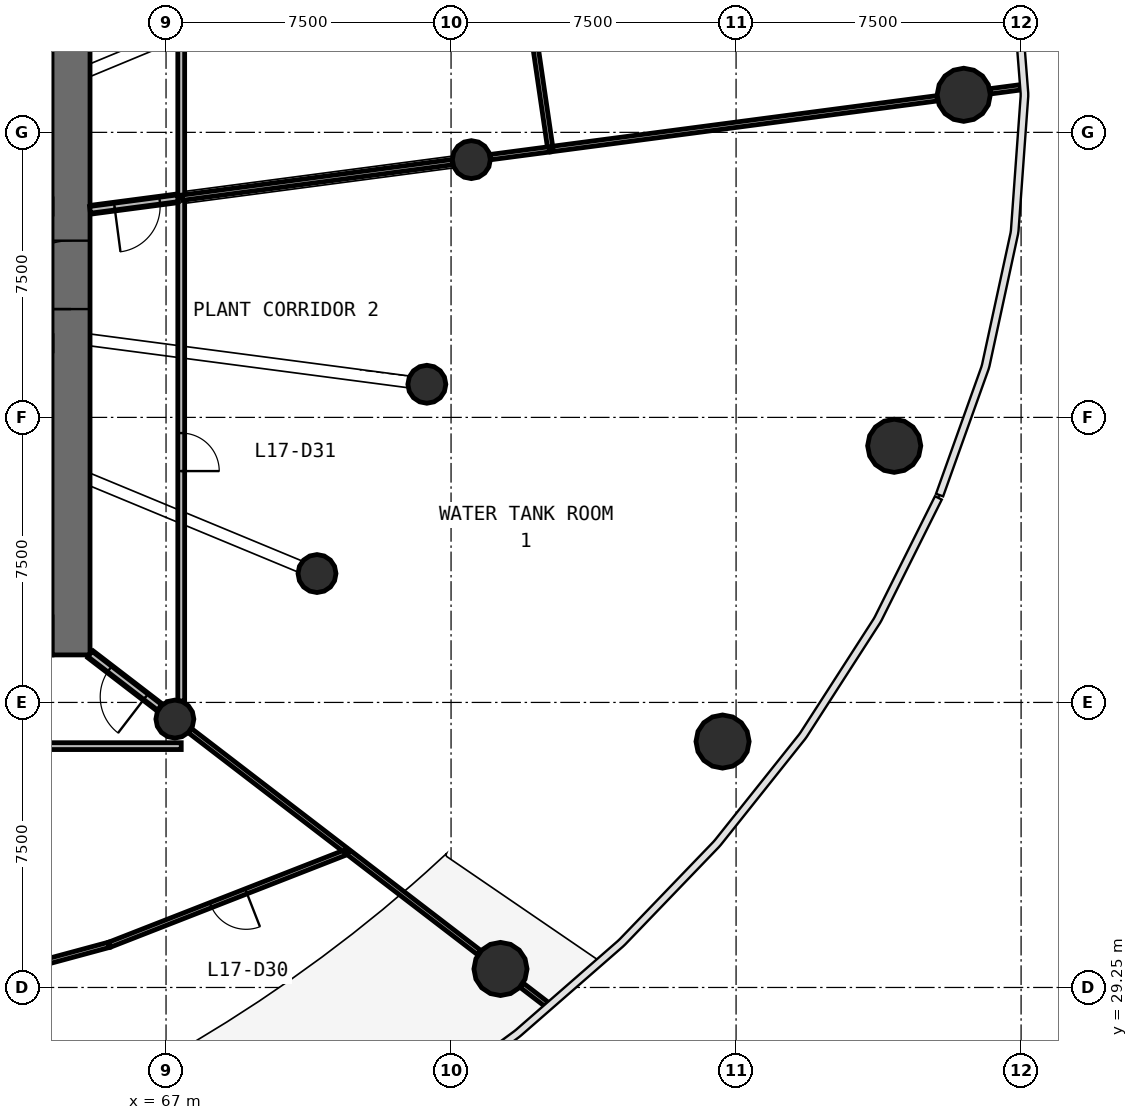
"""IFC4 building model, lengths in metres.
Left out: names, types, materials, properties, quantities, classifications, styles, units other than length and angle.
Written with IfcOpenShell. Run it as: python <this file> out.ifc"""

import sys

from ifc_helpers import new_model, si_unit, direction, frame, frame_2d, origin, origin_2d, place, context, subcontext, project, spatial, rectangle, circle, extrude, source, transform, mapped, element, fill, save


model = new_model("IFC4")
c1 = context("Model", 3, precision=1e-05, world=origin(), true_north=direction((0.0, 1.0)))
c2 = subcontext(c1, "Body", "Model", "MODEL_VIEW")
j1 = project(units=[si_unit("LENGTHUNIT", "METRE"), si_unit("PLANEANGLEUNIT", "RADIAN")], contexts=[c1])
p1 = place(None, origin())
s1 = spatial("IfcSite", under=j1, at=p1, CompositionType="ELEMENT")
p2 = place(p1, origin())
s2 = spatial("IfcBuilding", under=s1, at=p2, CompositionType="ELEMENT")
p3 = place(p2, frame((0.0, 0.0, 75.4)))
s3 = spatial("IfcBuildingStorey", under=s2, at=p3, CompositionType="ELEMENT", Elevation=75.4)
p4 = place(p3, frame((64.5, 38.0, 0.0), z_axis=(0.0, 0.0, 1.0), x_axis=(0.0, 1.0, 0.0)))
e1 = element("IfcWall", 1, at=p4, inside=s3, PredefinedType="SHEAR", context=c2, shape_type="SweptSolid", body=[
    extrude(rectangle(XDim=20.0, YDim=1.0, at=frame_2d((10.0, 0.0))), origin(), (0.0, 0.0, 1.0), 4.4),
])
p5 = place(p4, frame((9.1, 0.0, 0.0)))
e2 = element("IfcOpeningElement", 2, at=p5, cuts=e1, PredefinedType="OPENING", context=c2, shape_type="SweptSolid", body=[
    extrude(rectangle(XDim=1.8, YDim=2.1, at=frame_2d((0.9, 1.05))), frame((0.0, 0.51, 0.0), z_axis=(0.0, -1.0, 0.0), x_axis=(1.0, 0.0, 0.0)), (0.0, 0.0, 1.0), 1.02),
])
m1 = source(origin(), c2, "Body", "SweptSolid", [
    extrude(circle(Radius=0.7, at=origin_2d()), origin(), (0.0, 0.0, 1.0), 4.0),
])
for number, where, z_axis, x_axis in (
    (3, (87.99, 52.738, 0.0), (0.0, 0.0, 1.0), (1.0, 0.0, 0.0)),
    (4, (75.801, 29.737, 0.0), (0.0, 0.0, 1.0), (1.0, 0.0, 0.0)),
    (5, (81.645, 35.721, 0.0), (0.0, 0.0, 1.0), (1.0, 0.0, 0.0)),
    (6, (86.161, 43.503, 0.0), (0.0, 0.0, 1.0), (1.0, 0.0, 0.0)),
):
    element("IfcColumn", number, at=place(p3, frame(where, z_axis=z_axis, x_axis=x_axis)), inside=s3, PredefinedType="COLUMN", context=c2, shape_type="MappedRepresentation", body=[
        mapped(m1, transform((0.0, 0.0, 0.0), scale=1.0)),
    ])
m2 = source(origin(), c2, "Body", "SweptSolid", [
    extrude(circle(Radius=0.5, at=origin_2d()), origin(), (0.0, 0.0, 1.0), 4.4),
])
for number, where, z_axis, x_axis in (
    (7, (75.034, 51.032, 0.0), (0.0, 0.0, 1.0), (1.0, 0.0, 0.0)),
    (8, (67.232, 36.312, 0.0), (0.0, 0.0, 1.0), (1.0, 0.0, 0.0)),
    (9, (70.972, 40.141, 0.0), (0.0, 0.0, 1.0), (1.0, 0.0, 0.0)),
    (10, (73.863, 45.122, 0.0), (0.0, 0.0, 1.0), (1.0, 0.0, 0.0)),
):
    element("IfcColumn", number, at=place(p3, frame(where, z_axis=z_axis, x_axis=x_axis)), inside=s3, PredefinedType="COLUMN", context=c2, shape_type="MappedRepresentation", body=[
        mapped(m2, transform((0.0, 0.0, 0.0), scale=1.0)),
    ])
p6 = place(p3, frame((67.4, 35.6, 0.0), z_axis=(0.0, 0.0, 1.0), x_axis=(-1.0, 0.0, 0.0)))
e11 = element("IfcWall", 11, at=p6, inside=s3, PredefinedType="PARTITIONING", context=c2, shape_type="SweptSolid", body=[
    extrude(rectangle(XDim=13.767, YDim=0.18, at=frame_2d((6.884, 0.0))), origin(), (0.0, 0.0, 1.0), 2.8),
])
p7 = place(p6, frame((6.317, 0.0, 0.0)))
e12 = element("IfcOpeningElement", 12, at=p7, cuts=e11, PredefinedType="OPENING", context=c2, shape_type="SweptSolid", body=[
    extrude(rectangle(XDim=1.0, YDim=2.1, at=frame_2d((0.5, 1.05))), frame((0.0, 0.1, 0.0), z_axis=(0.0, -1.0, 0.0), x_axis=(1.0, 0.0, 0.0)), (0.0, 0.0, 1.0), 0.2),
])
p8 = place(p3, frame((67.4, 50.027, 0.0), z_axis=(0.0, 0.0, 1.0), x_axis=(0.0, -1.0, 0.0)))
e13 = element("IfcWall", 13, at=p8, inside=s3, PredefinedType="PARTITIONING", context=c2, shape_type="SweptSolid", body=[
    extrude(rectangle(XDim=13.24, YDim=0.18, at=frame_2d((6.62, 0.0))), origin(), (0.0, 0.0, 1.0), 2.8),
])
p9 = place(p8, frame((6.19, 0.0, 0.0)))
e14 = element("IfcOpeningElement", 14, at=p9, cuts=e13, PredefinedType="OPENING", context=c2, shape_type="SweptSolid", body=[
    extrude(rectangle(XDim=1.0, YDim=2.1, at=frame_2d((0.5, 1.05))), frame((0.0, 0.1, 0.0), z_axis=(0.0, -1.0, 0.0), x_axis=(1.0, 0.0, 0.0)), (0.0, 0.0, 1.0), 0.2),
])
p10 = place(p3, frame((67.4, 60.4, 0.0), z_axis=(0.0, 0.0, 1.0), x_axis=(0.0, -1.0, 0.0)))
e15 = element("IfcWall", 15, at=p10, inside=s3, PredefinedType="PARTITIONING", context=c2, shape_type="SweptSolid", body=[
    extrude(rectangle(XDim=10.343, YDim=0.18, at=frame_2d((5.171, 0.0))), origin(), (0.0, 0.0, 1.0), 2.8),
])
p11 = place(p10, frame((4.693, 0.0, 0.0)))
e16 = element("IfcOpeningElement", 16, at=p11, cuts=e15, PredefinedType="OPENING", context=c2, shape_type="SweptSolid", body=[
    extrude(rectangle(XDim=1.0, YDim=2.1, at=frame_2d((0.5, 1.05))), frame((0.0, 0.1, 0.0), z_axis=(0.0, -1.0, 0.0), x_axis=(1.0, 0.0, 0.0)), (0.0, 0.0, 1.0), 0.2),
])
p12 = place(p3, frame((67.31, 50.016, 0.0), z_axis=(0.0, 0.0, 1.0), x_axis=(-0.991440737811, -0.130557509967, 0.0)))
e17 = element("IfcWall", 17, at=p12, inside=s3, PredefinedType="PARTITIONING", context=c2, shape_type="SweptSolid", body=[
    extrude(rectangle(XDim=2.33, YDim=0.18, at=frame_2d((1.165, 0.0))), origin(), (0.0, 0.0, 1.0), 2.8),
])
p13 = place(p12, frame((0.48, 0.0, 0.0)))
e18 = element("IfcOpeningElement", 18, at=p13, cuts=e17, PredefinedType="OPENING", context=c2, shape_type="SweptSolid", body=[
    extrude(rectangle(XDim=1.2, YDim=2.1, at=frame_2d((0.6, 1.05))), frame((0.0, 0.1, 0.0), z_axis=(0.0, -1.0, 0.0), x_axis=(1.0, 0.0, 0.0)), (0.0, 0.0, 1.0), 0.2),
])
p14 = place(p3, frame((66.832, 36.619, 0.0), z_axis=(0.0, 0.0, 1.0), x_axis=(-0.793393624489, 0.608708926023, 0.0)))
e19 = element("IfcWall", 19, at=p14, inside=s3, PredefinedType="PARTITIONING", context=c2, shape_type="SweptSolid", body=[
    extrude(rectangle(XDim=2.309, YDim=0.18, at=frame_2d((1.155, 0.0))), origin(), (0.0, 0.0, 1.0), 2.8),
])
p15 = place(p14, frame((0.459, 0.0, 0.0)))
e20 = element("IfcOpeningElement", 20, at=p15, cuts=e19, PredefinedType="OPENING", context=c2, shape_type="SweptSolid", body=[
    extrude(rectangle(XDim=1.2, YDim=2.1, at=frame_2d((0.6, 1.05))), frame((0.0, 0.1, 0.0), z_axis=(0.0, -1.0, 0.0), x_axis=(1.0, 0.0, 0.0)), (0.0, 0.0, 1.0), 0.2),
])
p16 = place(p3, frame((77.115, 51.306, 0.0), z_axis=(0.0, 0.0, 1.0), x_axis=(0.991445064554, 0.130524648905, 0.0)))
e21 = element("IfcWall", 21, at=p16, inside=s3, PredefinedType="PARTITIONING", context=c2, shape_type="SweptSolid", body=[
    extrude(rectangle(XDim=10.265, YDim=0.14, at=frame_2d((5.133, 0.0))), origin(), (0.0, 0.0, 1.0), 2.8),
])
p17 = place(p3, frame((67.43, 50.031, 0.0), z_axis=(0.0, 0.0, 1.0), x_axis=(0.991448495935, 0.130498582014, 0.0)))
e22 = element("IfcWall", 22, at=p17, inside=s3, PredefinedType="PARTITIONING", context=c2, shape_type="SweptSolid", body=[
    extrude(rectangle(XDim=7.165, YDim=0.14, at=frame_2d((3.583, 0.0))), origin(), (0.0, 0.0, 1.0), 2.8),
])
p18 = place(p3, frame((76.141, 57.968, 0.0), z_axis=(0.0, 0.0, 1.0), x_axis=(0.144720027083, -0.989472644271, 0.0)))
e23 = element("IfcWall", 23, at=p18, inside=s3, PredefinedType="PARTITIONING", context=c2, shape_type="SweptSolid", body=[
    extrude(rectangle(XDim=6.702, YDim=0.14, at=frame_2d((3.351, 0.0))), origin(), (0.0, 0.0, 1.0), 2.8),
])
p19 = place(p18, frame((2.852, 0.0, 0.0)))
e24 = element("IfcOpeningElement", 24, at=p19, cuts=e23, PredefinedType="OPENING", context=c2, shape_type="SweptSolid", body=[
    extrude(rectangle(XDim=1.0, YDim=2.1, at=frame_2d((0.5, 1.05))), frame((0.0, 0.08, 0.0), z_axis=(0.0, -1.0, 0.0), x_axis=(1.0, 0.0, 0.0)), (0.0, 0.0, 1.0), 0.16),
])
p20 = place(p3, frame((71.778, 32.824, 0.0), z_axis=(0.0, 0.0, 1.0), x_axis=(-0.931368207831, -0.36407864733, 0.0)))
e25 = element("IfcWall", 25, at=p20, inside=s3, PredefinedType="PARTITIONING", context=c2, shape_type="SweptSolid", body=[
    extrude(rectangle(XDim=6.717, YDim=0.14, at=frame_2d((3.358, 0.0))), origin(), (0.0, 0.0, 1.0), 2.8),
])
p21 = place(p20, frame((2.867, 0.0, 0.0)))
e26 = element("IfcOpeningElement", 26, at=p21, cuts=e25, PredefinedType="OPENING", context=c2, shape_type="SweptSolid", body=[
    extrude(rectangle(XDim=1.0, YDim=2.1, at=frame_2d((0.5, 1.05))), frame((0.0, 0.08, 0.0), z_axis=(0.0, -1.0, 0.0), x_axis=(1.0, 0.0, 0.0)), (0.0, 0.0, 1.0), 0.16),
])
p22 = place(p3, frame((59.926, 28.865, 0.0), z_axis=(0.0, 0.0, 1.0), x_axis=(0.965338892276, 0.260999661033, 0.0)))
e27 = element("IfcWall", 27, at=p22, inside=s3, PredefinedType="PARTITIONING", context=c2, shape_type="SweptSolid", body=[
    extrude(rectangle(XDim=5.767, YDim=0.14, at=frame_2d((2.883, 0.0))), origin(), (0.0, 0.0, 1.0), 2.8),
])
p23 = place(p3, frame((67.633, 36.005, 0.0), z_axis=(0.0, 0.0, 1.0), x_axis=(0.793361042254, -0.608751391484, 0.0)))
e28 = element("IfcWall", 28, at=p23, inside=s3, PredefinedType="PARTITIONING", context=c2, shape_type="SweptSolid", body=[
    extrude(rectangle(XDim=5.143, YDim=0.14, at=frame_2d((2.572, 0.0))), origin(), (0.0, 0.0, 1.0), 2.8),
])
p24 = place(p3, frame((71.802, 32.806, 0.0), z_axis=(0.0, 0.0, 1.0), x_axis=(0.793358014638, -0.608755337233, 0.0)))
e29 = element("IfcWall", 29, at=p24, inside=s3, PredefinedType="PARTITIONING", context=c2, shape_type="SweptSolid", body=[
    extrude(rectangle(XDim=4.336, YDim=0.14, at=frame_2d((2.168, 0.0))), origin(), (0.0, 0.0, 1.0), 2.8),
])
p25 = place(p3, frame((75.534, 51.098, 0.0), z_axis=(0.0, 0.0, 1.0), x_axis=(0.991455357704, 0.130446439887, 0.0)))
e30 = element("IfcWall", 30, at=p25, inside=s3, PredefinedType="PARTITIONING", context=c2, shape_type="SweptSolid", body=[
    extrude(rectangle(XDim=1.565, YDim=0.14, at=frame_2d((0.782, 0.0))), origin(), (0.0, 0.0, 1.0), 2.8),
])
p26 = place(p3, frame((76.359, 29.309, 0.0), z_axis=(0.0, 0.0, 1.0), x_axis=(0.793252635304, -0.608892647832, 0.0)))
e31 = element("IfcWall", 31, at=p26, inside=s3, PredefinedType="PARTITIONING", context=c2, shape_type="SweptSolid", body=[
    extrude(rectangle(XDim=0.822, YDim=0.14, at=frame_2d((0.411, 0.0))), origin(), (0.0, 0.0, 1.0), 3.1),
])
p27 = place(p3, frame((88.689, 52.83, 0.0), z_axis=(0.0, 0.0, 1.0), x_axis=(0.991421968508, 0.130699963122, 0.0)))
e32 = element("IfcWall", 32, at=p27, inside=s3, PredefinedType="PARTITIONING", context=c2, shape_type="SweptSolid", body=[
    extrude(rectangle(XDim=0.798, YDim=0.14, at=frame_2d((0.399, 0.0))), origin(), (0.0, 0.0, 1.0), 3.1),
])
m3 = source(origin(), c2, "Body", "SweptSolid", [
    extrude(rectangle(XDim=1.8, YDim=2.1, at=frame_2d((0.9, 1.05))), frame((0.0, 0.025, 0.0), z_axis=(0.0, -1.0, 0.0), x_axis=(1.0, 0.0, 0.0)), (0.0, 0.0, 1.0), 0.05),
])
p28 = place(p5, origin())
e33 = element("IfcDoor", 33, at=p28, inside=s3, OperationType="SINGLE_SWING_LEFT", PredefinedType="DOOR", context=c2, shape_type="MappedRepresentation", body=[
    mapped(m3, transform((0.0, 0.0, 0.0), scale=1.0)),
])
fill(e2, e33)
m4 = source(origin(), c2, "Body", "SweptSolid", [
    extrude(rectangle(XDim=1.0, YDim=2.1, at=frame_2d((0.5, 1.05))), frame((0.0, 0.025, 0.0), z_axis=(0.0, -1.0, 0.0), x_axis=(1.0, 0.0, 0.0)), (0.0, 0.0, 1.0), 0.05),
])
p29 = place(p21, origin())
e34 = element("IfcDoor", 34, at=p29, inside=s3, OperationType="SINGLE_SWING_LEFT", PredefinedType="DOOR", context=c2, shape_type="MappedRepresentation", body=[
    mapped(m4, transform((0.0, 0.0, 0.0), scale=1.0)),
])
fill(e26, e34)
p30 = place(p9, origin())
e35 = element("IfcDoor", 35, at=p30, inside=s3, OperationType="SINGLE_SWING_RIGHT", PredefinedType="DOOR", context=c2, shape_type="MappedRepresentation", body=[
    mapped(m4, transform((0.0, 0.0, 0.0), scale=1.0)),
])
fill(e14, e35)
m5 = source(origin(), c2, "Body", "SweptSolid", [
    extrude(rectangle(XDim=1.2, YDim=2.1, at=frame_2d((0.6, 1.05))), frame((0.0, 0.025, 0.0), z_axis=(0.0, -1.0, 0.0), x_axis=(1.0, 0.0, 0.0)), (0.0, 0.0, 1.0), 0.05),
])
p31 = place(p15, origin())
e36 = element("IfcDoor", 36, at=p31, inside=s3, OperationType="SINGLE_SWING_LEFT", PredefinedType="DOOR", context=c2, shape_type="MappedRepresentation", body=[
    mapped(m5, transform((0.0, 0.0, 0.0), scale=1.0)),
])
fill(e20, e36)
p32 = place(p13, origin())
e37 = element("IfcDoor", 37, at=p32, inside=s3, OperationType="SINGLE_SWING_RIGHT", PredefinedType="DOOR", context=c2, shape_type="MappedRepresentation", body=[
    mapped(m5, transform((0.0, 0.0, 0.0), scale=1.0)),
])
fill(e18, e37)
save(model, sys.argv[1])
